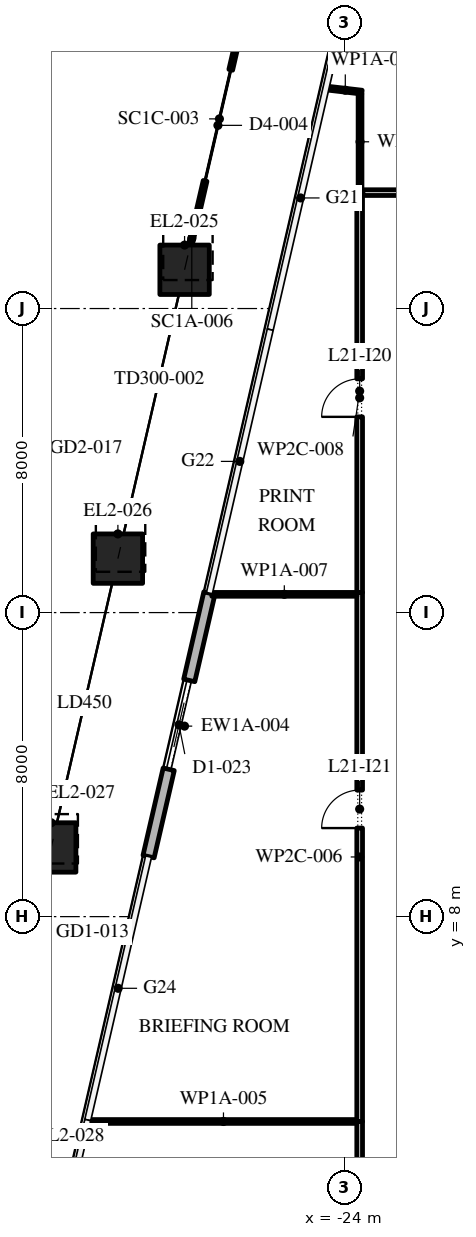
"""IFC4 building model, lengths in metres.
Left out: names, types, materials, properties, quantities, classifications, styles, units other than length and angle.
Written with IfcOpenShell. Run it as: python <this file> out.ifc"""

import sys

from ifc_helpers import new_model, si_unit, direction, frame, frame_2d, origin, origin_2d, place, context, subcontext, project, spatial, rectangle, extrude, element, fill, save


model = new_model("IFC4")
c1 = context("Model", 3, precision=1e-05, world=origin(), true_north=direction((0.0, 1.0)))
c2 = subcontext(c1, "Body", "Model", "MODEL_VIEW")
j1 = project(units=[si_unit("LENGTHUNIT", "METRE"), si_unit("PLANEANGLEUNIT", "RADIAN")], contexts=[c1])
p1 = place(None, origin())
s1 = spatial("IfcSite", under=j1, at=p1, CompositionType="ELEMENT")
p2 = place(p1, origin())
s2 = spatial("IfcBuilding", under=s1, at=p2, CompositionType="ELEMENT")
p3 = place(p2, frame((0.0, 0.0, 99.6)))
s3 = spatial("IfcBuildingStorey", under=s2, at=p3, CompositionType="ELEMENT", Elevation=99.6)
p4 = place(p3, frame((-28.207, 25.02, 0.0), z_axis=(0.014577044955, 0.063140125085, 0.997898208418), x_axis=(-0.974370069894, 0.224951032214, 0.0)))
e1 = element("IfcColumn", 1, at=p4, inside=s3, PredefinedType="COLUMN", context=c2, shape_type="SweptSolid", body=[
    extrude(rectangle(XDim=1.3, YDim=1.3, at=origin_2d()), origin(), (0.0, 0.0, 1.0), 6.013),
])
p5 = place(p3, frame((-29.961, 17.42, 0.0), z_axis=(0.01166233446, 0.050550327764, 0.998653420521), x_axis=(-0.974404395419, 0.224802300229, 0.0)))
e2 = element("IfcColumn", 2, at=p5, inside=s3, PredefinedType="COLUMN", context=c2, shape_type="SweptSolid", body=[
    extrude(rectangle(XDim=1.3, YDim=1.3, at=origin_2d()), origin(), (0.0, 0.0, 1.0), 6.008),
])
p6 = place(p3, frame((-31.716, 9.82, 0.0), z_axis=(0.008741740851, 0.037935089368, 0.999241968175), x_axis=(-0.974461559539, 0.224554378672, 0.0)))
e3 = element("IfcColumn", 3, at=p6, inside=s3, PredefinedType="COLUMN", context=c2, shape_type="SweptSolid", body=[
    extrude(rectangle(XDim=1.3, YDim=1.3, at=origin_2d()), origin(), (0.0, 0.0, 1.0), 6.005),
])
p7 = place(p3, frame((-27.554, 16.512, 0.0), z_axis=(0.0, 0.0, 1.0), x_axis=(-0.224949733175, -0.9743703698, 0.0)))
e4 = element("IfcWall", 4, at=p7, inside=s3, PredefinedType="STANDARD", context=c2, shape_type="SweptSolid", body=[
    extrude(rectangle(XDim=7.114, YDim=0.3, at=frame_2d((3.557, 0.0))), origin(), (0.0, 0.0, 1.0), 5.8),
])
p8 = place(p7, frame((2.357, 0.0, 0.0)))
e5 = element("IfcOpeningElement", 5, at=p8, cuts=e4, PredefinedType="OPENING", context=c2, shape_type="SweptSolid", body=[
    extrude(rectangle(XDim=2.4, YDim=3.5, at=frame_2d((1.2, 1.75))), frame((0.0, 0.16, 0.0), z_axis=(0.0, -1.0, 0.0), x_axis=(1.0, 0.0, 0.0)), (0.0, 0.0, 1.0), 0.32),
])
p9 = place(p3, frame((-26.603, 31.967, 0.0), z_axis=(0.0, 0.0, 1.0), x_axis=(-0.224944128694, -0.974371663671, 0.0)))
e6 = element("IfcWall", 6, at=p9, inside=s3, PredefinedType="STANDARD", context=c2, shape_type="SweptSolid", body=[
    extrude(rectangle(XDim=6.11, YDim=0.1, at=frame_2d((3.055, 0.0))), origin(), (0.0, 0.0, 1.0), 4.85),
])
p10 = place(p9, frame((1.73, 0.0, 0.0)))
e7 = element("IfcOpeningElement", 7, at=p10, cuts=e6, PredefinedType="OPENING", context=c2, shape_type="SweptSolid", body=[
    extrude(rectangle(XDim=3.0, YDim=3.5, at=frame_2d((1.5, 1.75))), frame((0.0, 0.06, 0.0), z_axis=(0.0, -1.0, 0.0), x_axis=(1.0, 0.0, 0.0)), (0.0, 0.0, 1.0), 0.12),
])
p11 = place(p3, frame((-24.416, 29.795, 0.0), z_axis=(0.0, 0.0, 1.0), x_axis=(0.993440426076, -0.114350862868, 0.0)))
e8 = element("IfcWall", 8, at=p11, inside=s3, PredefinedType="PARTITIONING", context=c2, shape_type="SweptSolid", body=[
    extrude(rectangle(XDim=0.882, YDim=0.1, at=frame_2d((0.441, 0.0))), origin(), (0.0, 0.0, 1.0), 5.8),
])
p12 = place(p3, frame((-23.6, -4.32, 0.0), z_axis=(0.0, 0.0, 1.0), x_axis=(0.0, 1.0, 0.0)))
e9 = element("IfcWall", 9, at=p12, inside=s3, PredefinedType="PARTITIONING", context=c2, shape_type="SweptSolid", body=[
    extrude(rectangle(XDim=6.93, YDim=0.15, at=frame_2d((3.465, 0.0))), origin(), (0.0, 0.0, 1.0), 5.8),
])
p13 = place(p12, frame((2.28, 0.0, 0.0)))
e10 = element("IfcOpeningElement", 10, at=p13, cuts=e9, PredefinedType="OPENING", context=c2, shape_type="SweptSolid", body=[
    extrude(rectangle(XDim=1.0, YDim=2.1, at=frame_2d((0.5, 1.05))), frame((0.0, 0.085, 0.0), z_axis=(0.0, -1.0, 0.0), x_axis=(1.0, 0.0, 0.0)), (0.0, 0.0, 1.0), 0.17),
])
p14 = place(p3, frame((-23.675, 2.61, 0.0), z_axis=(0.0, 0.0, 1.0), x_axis=(-1.0, 0.0, 0.0)))
e11 = element("IfcWall", 11, at=p14, inside=s3, PredefinedType="PARTITIONING", context=c2, shape_type="SweptSolid", body=[
    extrude(rectangle(XDim=7.017, YDim=0.1, at=frame_2d((3.508, 0.0))), origin(), (0.0, 0.0, 1.0), 5.8),
])
p15 = place(p3, frame((-23.6, 2.61, 0.0), z_axis=(0.0, 0.0, 1.0), x_axis=(0.0, 1.0, 0.0)))
e12 = element("IfcWall", 12, at=p15, inside=s3, PredefinedType="PARTITIONING", context=c2, shape_type="SweptSolid", body=[
    extrude(rectangle(XDim=13.92, YDim=0.15, at=frame_2d((6.96, 0.0))), origin(), (0.0, 0.0, 1.0), 5.8),
])
p16 = place(p15, frame((7.72, 0.0, 0.0)))
e13 = element("IfcOpeningElement", 13, at=p16, cuts=e12, PredefinedType="OPENING", context=c2, shape_type="SweptSolid", body=[
    extrude(rectangle(XDim=1.0, YDim=2.1, at=frame_2d((0.5, 1.05))), frame((0.0, 0.085, 0.0), z_axis=(0.0, -1.0, 0.0), x_axis=(1.0, 0.0, 0.0)), (0.0, 0.0, 1.0), 0.17),
])
p17 = place(p3, frame((-23.675, 16.48, 0.0), z_axis=(0.0, 0.0, 1.0), x_axis=(-1.0, 0.0, 0.0)))
e14 = element("IfcWall", 14, at=p17, inside=s3, PredefinedType="PARTITIONING", context=c2, shape_type="SweptSolid", body=[
    extrude(rectangle(XDim=3.815, YDim=0.1, at=frame_2d((1.907, 0.0))), origin(), (0.0, 0.0, 1.0), 5.8),
])
p18 = place(p3, frame((-23.6, 16.53, 0.0), z_axis=(0.0, 0.0, 1.0), x_axis=(0.0, 1.0, 0.0)))
e15 = element("IfcWall", 15, at=p18, inside=s3, PredefinedType="PARTITIONING", context=c2, shape_type="SweptSolid", body=[
    extrude(rectangle(XDim=10.595, YDim=0.15, at=frame_2d((5.297, 0.0))), origin(), (0.0, 0.0, 1.0), 5.8),
])
p19 = place(p18, frame((4.62, 0.0, 0.0)))
e16 = element("IfcOpeningElement", 16, at=p19, cuts=e15, PredefinedType="OPENING", context=c2, shape_type="SweptSolid", body=[
    extrude(rectangle(XDim=1.0, YDim=2.1, at=frame_2d((0.5, 1.05))), frame((0.0, 0.085, 0.0), z_axis=(0.0, -1.0, 0.0), x_axis=(1.0, 0.0, 0.0)), (0.0, 0.0, 1.0), 0.17),
])
p20 = place(p3, frame((-23.59, 27.125, 0.0), z_axis=(0.0, 0.0, 1.0), x_axis=(0.0, 1.0, 0.0)))
e17 = element("IfcWall", 17, at=p20, inside=s3, PredefinedType="PARTITIONING", context=c2, shape_type="SweptSolid", body=[
    extrude(rectangle(XDim=2.525, YDim=0.1, at=frame_2d((1.262, 0.0))), origin(), (0.0, 0.0, 1.0), 5.8),
])
p21 = place(p3, frame((-23.515, 27.05, 0.0), z_axis=(0.0, 0.0, 1.0), x_axis=(1.0, 0.0, 0.0)))
e18 = element("IfcWall", 18, at=p21, inside=s3, PredefinedType="PARTITIONING", context=c2, shape_type="SweptSolid", body=[
    extrude(rectangle(XDim=8.895, YDim=0.15, at=frame_2d((4.447, 0.0))), origin(), (0.0, 0.0, 1.0), 5.8),
])
p22 = place(p21, frame((5.695, 0.0, 0.0)))
e19 = element("IfcOpeningElement", 19, at=p22, cuts=e18, PredefinedType="OPENING", context=c2, shape_type="SweptSolid", body=[
    extrude(rectangle(XDim=1.0, YDim=2.1, at=frame_2d((0.5, 1.05))), frame((0.0, 0.085, 0.0), z_axis=(0.0, -1.0, 0.0), x_axis=(1.0, 0.0, 0.0)), (0.0, 0.0, 1.0), 0.17),
])
p23 = place(p3, frame((-27.978, 26.013, 0.0), z_axis=(0.0, 0.0, 1.0), x_axis=(-0.224910518966, -0.974379422227, 0.0)))
e20 = element("IfcWall", 20, at=p23, inside=s3, PredefinedType="STANDARD", context=c2, shape_type="SweptSolid", body=[
    extrude(rectangle(XDim=0.35, YDim=0.1, at=frame_2d((0.175, 0.0))), origin(), (0.0, 0.0, 1.0), 5.8),
])
p24 = place(p8, origin())
e21 = element("IfcDoor", 21, at=p24, inside=s3, OperationType="DOUBLE_DOOR_SLIDING", PredefinedType="DOOR", context=c2, shape_type="SweptSolid", body=[
    extrude(rectangle(XDim=2.4, YDim=3.5, at=frame_2d((1.2, 1.75))), frame((0.0, 0.025, 0.0), z_axis=(0.0, -1.0, 0.0), x_axis=(1.0, 0.0, 0.0)), (0.0, 0.0, 1.0), 0.05),
])
fill(e5, e21)
p25 = place(p10, origin())
e22 = element("IfcDoor", 22, at=p25, inside=s3, OperationType="DOUBLE_DOOR_SLIDING", PredefinedType="DOOR", context=c2, shape_type="SweptSolid", body=[
    extrude(rectangle(XDim=3.0, YDim=3.5, at=frame_2d((1.5, 1.75))), frame((0.0, 0.025, 0.0), z_axis=(0.0, -1.0, 0.0), x_axis=(1.0, 0.0, 0.0)), (0.0, 0.0, 1.0), 0.05),
])
fill(e7, e22)
p26 = place(p19, origin())
e23 = element("IfcDoor", 23, at=p26, inside=s3, OperationType="SINGLE_SWING_RIGHT", PredefinedType="DOOR", context=c2, shape_type="SweptSolid", body=[
    extrude(rectangle(XDim=1.0, YDim=2.1, at=frame_2d((0.5, 1.05))), frame((0.0, 0.025, 0.0), z_axis=(0.0, -1.0, 0.0), x_axis=(1.0, 0.0, 0.0)), (0.0, 0.0, 1.0), 0.05),
])
fill(e16, e23)
p27 = place(p16, origin())
e24 = element("IfcDoor", 24, at=p27, inside=s3, OperationType="SINGLE_SWING_RIGHT", PredefinedType="DOOR", context=c2, shape_type="SweptSolid", body=[
    extrude(rectangle(XDim=1.0, YDim=2.1, at=frame_2d((0.5, 1.05))), frame((0.0, 0.025, 0.0), z_axis=(0.0, -1.0, 0.0), x_axis=(1.0, 0.0, 0.0)), (0.0, 0.0, 1.0), 0.05),
])
fill(e13, e24)
save(model, sys.argv[1])
